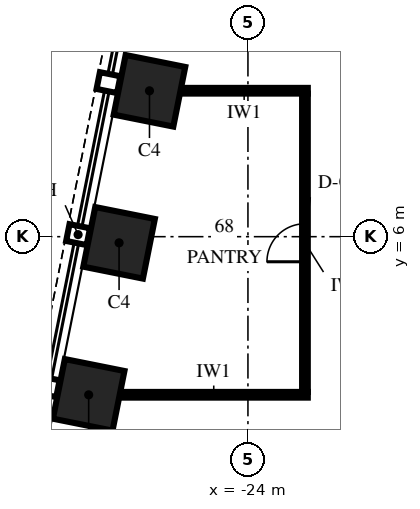
"""IFC4 building model, lengths in metres.
Left out: names, types, materials, properties, quantities, classifications, styles, units other than length and angle.
Written with IfcOpenShell. Run it as: python <this file> out.ifc"""

import sys

from ifc_helpers import new_model, si_unit, direction, frame, frame_2d, origin, origin_2d, place, context, subcontext, project, spatial, rectangle, extrude, element, fill, save


model = new_model("IFC4")
c1 = context("Model", 3, precision=1e-05, world=origin(), true_north=direction((0.0, 1.0)))
c2 = subcontext(c1, "Body", "Model", "MODEL_VIEW")
j1 = project(units=[si_unit("LENGTHUNIT", "METRE"), si_unit("PLANEANGLEUNIT", "RADIAN")], contexts=[c1])
p1 = place(None, origin())
s1 = spatial("IfcSite", under=j1, at=p1, CompositionType="ELEMENT")
p2 = place(p1, origin())
s2 = spatial("IfcBuilding", under=s1, at=p2, CompositionType="ELEMENT")
p3 = place(p2, frame((0.0, 0.0, 214.0)))
s3 = spatial("IfcBuildingStorey", under=s2, at=p3, CompositionType="ELEMENT", Elevation=214.0)
for number, where, z_axis, x_axis in (
    (1, (-26.591, 9.838, 0.0), (0.0, 0.0, 1.0), (-0.196, -0.981, 0.0)),
    (2, (-27.391, 5.838, 0.0), (0.0, 0.0, 1.0), (-0.196, -0.981, 0.0)),
    (3, (-28.191, 1.838, 0.0), (0.0, 0.0, 1.0), (-0.196, -0.981, 0.0)),
):
    element("IfcColumn", number, at=place(p3, frame(where, z_axis=z_axis, x_axis=x_axis)), inside=s3, PredefinedType="COLUMN", context=c2, shape_type="SweptSolid", body=[
        extrude(rectangle(XDim=1.6, YDim=1.6, at=origin_2d()), origin(), (0.0, 0.0, 1.0), 4.0),
    ])
p4 = place(p3, frame((-27.375, 1.84, 0.0), z_axis=(0.0, 0.0, 1.0), x_axis=(1.0, 0.0, 0.0)))
e4 = element("IfcWall", 4, at=p4, inside=s3, PredefinedType="PARTITIONING", context=c2, shape_type="SweptSolid", body=[
    extrude(rectangle(XDim=4.95, YDim=0.15, at=frame_2d((2.475, 0.0))), origin(), (0.0, 0.0, 1.0), 3.25),
])
p5 = place(p3, frame((-25.775, 9.84, 0.0), z_axis=(0.0, 0.0, 1.0), x_axis=(1.0, 0.0, 0.0)))
e5 = element("IfcWall", 5, at=p5, inside=s3, PredefinedType="PARTITIONING", context=c2, shape_type="SweptSolid", body=[
    extrude(rectangle(XDim=3.35, YDim=0.15, at=frame_2d((1.675, 0.0))), origin(), (0.0, 0.0, 1.0), 3.25),
])
p6 = place(p3, frame((-22.5, 1.915, 0.0), z_axis=(0.0, 0.0, 1.0), x_axis=(0.0, 1.0, 0.0)))
e6 = element("IfcWall", 6, at=p6, inside=s3, PredefinedType="PARTITIONING", context=c2, shape_type="SweptSolid", body=[
    extrude(rectangle(XDim=7.85, YDim=0.15, at=frame_2d((3.925, 0.0))), origin(), (0.0, 0.0, 1.0), 2.842),
])
p7 = place(p6, frame((3.425, 0.0, 0.0)))
e7 = element("IfcOpeningElement", 7, at=p7, cuts=e6, PredefinedType="OPENING", context=c2, shape_type="SweptSolid", body=[
    extrude(rectangle(XDim=1.0, YDim=2.3, at=frame_2d((0.5, 1.15))), frame((0.0, 0.09, 0.0), z_axis=(0.0, -1.0, 0.0), x_axis=(1.0, 0.0, 0.0)), (0.0, 0.0, 1.0), 0.18),
])
p8 = place(p7, origin())
e8 = element("IfcDoor", 8, at=p8, inside=s3, OperationType="SINGLE_SWING_LEFT", PredefinedType="DOOR", context=c2, shape_type="SweptSolid", body=[
    extrude(rectangle(XDim=1.0, YDim=2.3, at=frame_2d((0.5, 1.15))), frame((0.0, 0.075, 0.0), z_axis=(0.0, -1.0, 0.0), x_axis=(1.0, 0.0, 0.0)), (0.0, 0.0, 1.0), 0.149),
])
fill(e7, e8)
save(model, sys.argv[1])
